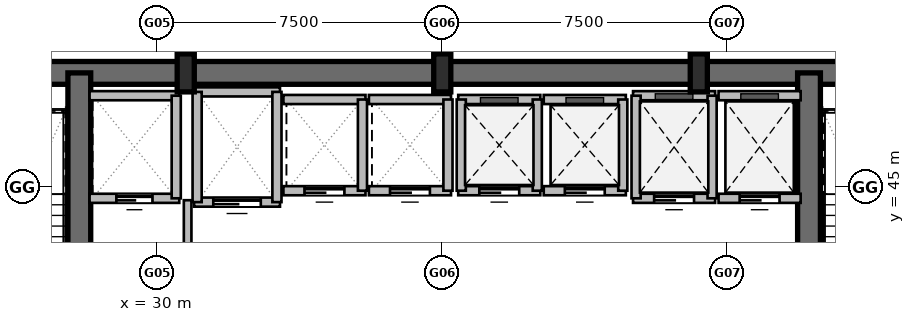
"""IFC4 building model, lengths in metres.
Left out: names, types, materials, properties, quantities, classifications, styles, units other than length and angle.
Written with IfcOpenShell. Run it as: python <this file> out.ifc"""

import sys

from ifc_helpers import new_model, si_unit, direction, frame, frame_2d, origin, origin_2d, place, context, subcontext, project, spatial, rectangle, i_section, extrude, element, fill, save


model = new_model("IFC4")
c1 = context("Model", 3, precision=1e-05, world=origin(), true_north=direction((0.0, 1.0)))
c2 = subcontext(c1, "Body", "Model", "MODEL_VIEW")
j1 = project(units=[si_unit("LENGTHUNIT", "METRE"), si_unit("PLANEANGLEUNIT", "RADIAN")], contexts=[c1])
p1 = place(None, origin())
s1 = spatial("IfcSite", under=j1, at=p1, CompositionType="ELEMENT")
p2 = place(p1, origin())
s2 = spatial("IfcBuilding", under=s1, at=p2, CompositionType="ELEMENT")
p3 = place(p2, origin())
s3 = spatial("IfcBuildingStorey", under=s2, at=p3, CompositionType="ELEMENT", Elevation=0.0)
p4 = place(p3, frame((23.7, 48.0, 0.0), z_axis=(0.0, 0.0, 1.0), x_axis=(1.0, 0.0, 0.0)))
e1 = element("IfcWall", 1, at=p4, inside=s3, PredefinedType="SHEAR", context=c2, shape_type="SweptSolid", body=[
    extrude(rectangle(XDim=27.6, YDim=0.6, at=frame_2d((13.8, 0.0))), origin(), (0.0, 0.0, 1.0), 6.0),
])
for number, where, z_axis, x_axis in (
    (2, (27.95, 38.2, 0.0), (0.0, 0.0, 1.0), (0.0, 1.0, 0.0)),
    (3, (47.15, 38.2, 0.0), (0.0, 0.0, 1.0), (0.0, 1.0, 0.0)),
):
    element("IfcWall", number, at=place(p3, frame(where, z_axis=z_axis, x_axis=x_axis)), inside=s3, PredefinedType="SHEAR", context=c2, shape_type="SweptSolid", body=[
        extrude(rectangle(XDim=9.8, YDim=0.6, at=frame_2d((4.9, 0.0))), origin(), (0.0, 0.0, 1.0), 6.0),
    ])
for number, where, z_axis, x_axis in (
    (4, (30.75, 48.0, 0.0), (0.0, 0.0, 1.0), (1.0, 0.0, 0.0)),
    (5, (37.5, 48.0, 0.0), (0.0, 0.0, 1.0), (1.0, 0.0, 0.0)),
    (6, (44.25, 48.0, 0.0), (0.0, 0.0, 1.0), (1.0, 0.0, 0.0)),
):
    element("IfcColumn", number, at=place(p3, frame(where, z_axis=z_axis, x_axis=x_axis)), inside=s3, PredefinedType="COLUMN", context=c2, shape_type="SweptSolid", body=[
        extrude(i_section(OverallWidth=0.45, OverallDepth=1.0, WebThickness=0.022, FlangeThickness=0.04, at=origin_2d()), origin(), (0.0, 0.0, 1.0), 6.0),
    ])
p5 = place(p3, frame((30.8, 38.2, 0.0), z_axis=(0.0, 0.0, 1.0), x_axis=(0.0, 1.0, 0.0)))
e7 = element("IfcWall", 7, at=p5, inside=s3, PredefinedType="PARTITIONING", context=c2, shape_type="SweptSolid", body=[
    extrude(rectangle(XDim=6.45, YDim=0.2, at=frame_2d((3.225, 0.0))), origin(), (0.0, 0.0, 1.0), 4.88),
])
p6 = place(p5, frame((3.1, 0.0, 0.0)))
e8 = element("IfcOpeningElement", 8, at=p6, cuts=e7, PredefinedType="OPENING", context=c2, shape_type="SweptSolid", body=[
    extrude(rectangle(XDim=1.05, YDim=2.1, at=frame_2d((0.525, 1.05))), frame((0.0, 0.11, 0.0), z_axis=(0.0, -1.0, 0.0), x_axis=(1.0, 0.0, 0.0)), (0.0, 0.0, 1.0), 0.22),
])
p7 = place(p3, frame((28.22, 44.7, 0.0), z_axis=(0.0, 0.0, 1.0), x_axis=(1.0, 0.0, 0.0)))
e9 = element("IfcWall", 9, at=p7, inside=s3, PredefinedType="PARTITIONING", context=c2, shape_type="SweptSolid", body=[
    extrude(rectangle(XDim=2.36, YDim=0.24, at=frame_2d((1.18, 0.0))), origin(), (0.0, 0.0, 1.0), 5.68),
])
p8 = place(p7, frame((0.705, 0.0, 0.0)))
e10 = element("IfcOpeningElement", 10, at=p8, cuts=e9, PredefinedType="OPENING", context=c2, shape_type="SweptSolid", body=[
    extrude(rectangle(XDim=0.95, YDim=2.15, at=frame_2d((0.475, 1.075))), frame((0.0, 0.13, 0.0), z_axis=(0.0, -1.0, 0.0), x_axis=(1.0, 0.0, 0.0)), (0.0, 0.0, 1.0), 0.26),
])
p9 = place(p3, frame((28.22, 47.4, 0.0), z_axis=(0.0, 0.0, 1.0), x_axis=(1.0, 0.0, 0.0)))
e11 = element("IfcWall", 11, at=p9, inside=s3, PredefinedType="PARTITIONING", context=c2, shape_type="SweptSolid", body=[
    extrude(rectangle(XDim=2.36, YDim=0.24, at=frame_2d((1.18, 0.0))), origin(), (0.0, 0.0, 1.0), 5.68),
])
p10 = place(p3, frame((30.5, 44.7, 0.0), z_axis=(0.0, 0.0, 1.0), x_axis=(0.0, 1.0, 0.0)))
e12 = element("IfcWall", 12, at=p10, inside=s3, PredefinedType="PARTITIONING", context=c2, shape_type="SweptSolid", body=[
    extrude(rectangle(XDim=2.7, YDim=0.24, at=frame_2d((1.35, 0.0))), origin(), (0.0, 0.0, 1.0), 4.88),
])
p11 = place(p3, frame((30.97, 44.6, 0.0), z_axis=(0.0, 0.0, 1.0), x_axis=(1.0, 0.0, 0.0)))
e13 = element("IfcWall", 13, at=p11, inside=s3, PredefinedType="PARTITIONING", context=c2, shape_type="SweptSolid", body=[
    extrude(rectangle(XDim=2.26, YDim=0.24, at=frame_2d((1.13, 0.0))), origin(), (0.0, 0.0, 1.0), 5.68),
])
p12 = place(p11, frame((0.505, 0.0, 0.0)))
e14 = element("IfcOpeningElement", 14, at=p12, cuts=e13, PredefinedType="OPENING", context=c2, shape_type="SweptSolid", body=[
    extrude(rectangle(XDim=1.25, YDim=2.2, at=frame_2d((0.625, 1.1))), frame((0.0, 0.13, 0.0), z_axis=(0.0, -1.0, 0.0), x_axis=(1.0, 0.0, 0.0)), (0.0, 0.0, 1.0), 0.26),
])
p13 = place(p3, frame((30.97, 47.5, 0.0), z_axis=(0.0, 0.0, 1.0), x_axis=(1.0, 0.0, 0.0)))
e15 = element("IfcWall", 15, at=p13, inside=s3, PredefinedType="PARTITIONING", context=c2, shape_type="SweptSolid", body=[
    extrude(rectangle(XDim=2.26, YDim=0.24, at=frame_2d((1.13, 0.0))), origin(), (0.0, 0.0, 1.0), 5.68),
])
p14 = place(p3, frame((31.05, 44.6, 0.0), z_axis=(0.0, 0.0, 1.0), x_axis=(0.0, 1.0, 0.0)))
e16 = element("IfcWall", 16, at=p14, inside=s3, PredefinedType="PARTITIONING", context=c2, shape_type="SweptSolid", body=[
    extrude(rectangle(XDim=2.9, YDim=0.24, at=frame_2d((1.45, 0.0))), origin(), (0.0, 0.0, 1.0), 4.88),
])
p15 = place(p3, frame((33.15, 44.6, 0.0), z_axis=(0.0, 0.0, 1.0), x_axis=(0.0, 1.0, 0.0)))
e17 = element("IfcWall", 17, at=p15, inside=s3, PredefinedType="PARTITIONING", context=c2, shape_type="SweptSolid", body=[
    extrude(rectangle(XDim=2.9, YDim=0.24, at=frame_2d((1.45, 0.0))), origin(), (0.0, 0.0, 1.0), 5.68),
])
p16 = place(p3, frame((33.32, 44.9, 0.0), z_axis=(0.0, 0.0, 1.0), x_axis=(1.0, 0.0, 0.0)))
e18 = element("IfcWall", 18, at=p16, inside=s3, PredefinedType="PARTITIONING", context=c2, shape_type="SweptSolid", body=[
    extrude(rectangle(XDim=2.16, YDim=0.24, at=frame_2d((1.08, 0.0))), origin(), (0.0, 0.0, 1.0), 5.68),
])
p17 = place(p16, frame((0.555, 0.0, 0.0)))
e19 = element("IfcOpeningElement", 19, at=p17, cuts=e18, PredefinedType="OPENING", context=c2, shape_type="SweptSolid", body=[
    extrude(rectangle(XDim=1.05, YDim=2.15, at=frame_2d((0.525, 1.075))), frame((0.0, 0.13, 0.0), z_axis=(0.0, -1.0, 0.0), x_axis=(1.0, 0.0, 0.0)), (0.0, 0.0, 1.0), 0.26),
])
p18 = place(p3, frame((33.32, 47.3, 0.0), z_axis=(0.0, 0.0, 1.0), x_axis=(1.0, 0.0, 0.0)))
e20 = element("IfcWall", 20, at=p18, inside=s3, PredefinedType="PARTITIONING", context=c2, shape_type="SweptSolid", body=[
    extrude(rectangle(XDim=2.16, YDim=0.24, at=frame_2d((1.08, 0.0))), origin(), (0.0, 0.0, 1.0), 5.68),
])
p19 = place(p3, frame((35.4, 44.9, 0.0), z_axis=(0.0, 0.0, 1.0), x_axis=(0.0, 1.0, 0.0)))
e21 = element("IfcWall", 21, at=p19, inside=s3, PredefinedType="PARTITIONING", context=c2, shape_type="SweptSolid", body=[
    extrude(rectangle(XDim=2.4, YDim=0.24, at=frame_2d((1.2, 0.0))), origin(), (0.0, 0.0, 1.0), 5.68),
])
p20 = place(p3, frame((35.57, 44.9, 0.0), z_axis=(0.0, 0.0, 1.0), x_axis=(1.0, 0.0, 0.0)))
e22 = element("IfcWall", 22, at=p20, inside=s3, PredefinedType="PARTITIONING", context=c2, shape_type="SweptSolid", body=[
    extrude(rectangle(XDim=2.16, YDim=0.24, at=frame_2d((1.08, 0.0))), origin(), (0.0, 0.0, 1.0), 5.68),
])
p21 = place(p20, frame((0.555, 0.0, 0.0)))
e23 = element("IfcOpeningElement", 23, at=p21, cuts=e22, PredefinedType="OPENING", context=c2, shape_type="SweptSolid", body=[
    extrude(rectangle(XDim=1.05, YDim=2.15, at=frame_2d((0.525, 1.075))), frame((0.0, 0.13, 0.0), z_axis=(0.0, -1.0, 0.0), x_axis=(1.0, 0.0, 0.0)), (0.0, 0.0, 1.0), 0.26),
])
p22 = place(p3, frame((35.57, 47.3, 0.0), z_axis=(0.0, 0.0, 1.0), x_axis=(1.0, 0.0, 0.0)))
e24 = element("IfcWall", 24, at=p22, inside=s3, PredefinedType="PARTITIONING", context=c2, shape_type="SweptSolid", body=[
    extrude(rectangle(XDim=2.16, YDim=0.24, at=frame_2d((1.08, 0.0))), origin(), (0.0, 0.0, 1.0), 5.68),
])
p23 = place(p3, frame((37.65, 44.9, 0.0), z_axis=(0.0, 0.0, 1.0), x_axis=(0.0, 1.0, 0.0)))
e25 = element("IfcWall", 25, at=p23, inside=s3, PredefinedType="PARTITIONING", context=c2, shape_type="SweptSolid", body=[
    extrude(rectangle(XDim=2.4, YDim=0.24, at=frame_2d((1.2, 0.0))), origin(), (0.0, 0.0, 1.0), 5.68),
])
p24 = place(p3, frame((37.92, 44.9, 0.0), z_axis=(0.0, 0.0, 1.0), x_axis=(1.0, 0.0, 0.0)))
e26 = element("IfcWall", 26, at=p24, inside=s3, PredefinedType="PARTITIONING", context=c2, shape_type="SweptSolid", body=[
    extrude(rectangle(XDim=2.16, YDim=0.24, at=frame_2d((1.08, 0.0))), origin(), (0.0, 0.0, 1.0), 5.68),
])
p25 = place(p24, frame((0.555, 0.0, 0.0)))
e27 = element("IfcOpeningElement", 27, at=p25, cuts=e26, PredefinedType="OPENING", context=c2, shape_type="SweptSolid", body=[
    extrude(rectangle(XDim=1.05, YDim=2.15, at=frame_2d((0.525, 1.075))), frame((0.0, 0.13, 0.0), z_axis=(0.0, -1.0, 0.0), x_axis=(1.0, 0.0, 0.0)), (0.0, 0.0, 1.0), 0.26),
])
p26 = place(p3, frame((37.92, 47.3, 0.0), z_axis=(0.0, 0.0, 1.0), x_axis=(1.0, 0.0, 0.0)))
e28 = element("IfcWall", 28, at=p26, inside=s3, PredefinedType="PARTITIONING", context=c2, shape_type="SweptSolid", body=[
    extrude(rectangle(XDim=2.16, YDim=0.24, at=frame_2d((1.08, 0.0))), origin(), (0.0, 0.0, 1.0), 5.68),
])
for number, where, z_axis, x_axis in (
    (29, (38.0, 44.9, 0.0), (0.0, 0.0, 1.0), (0.0, 1.0, 0.0)),
    (30, (40.0, 44.9, 0.0), (0.0, 0.0, 1.0), (0.0, 1.0, 0.0)),
):
    element("IfcWall", number, at=place(p3, frame(where, z_axis=z_axis, x_axis=x_axis)), inside=s3, PredefinedType="PARTITIONING", context=c2, shape_type="SweptSolid", body=[
        extrude(rectangle(XDim=2.4, YDim=0.24, at=frame_2d((1.2, 0.0))), origin(), (0.0, 0.0, 1.0), 5.68),
    ])
p27 = place(p3, frame((40.17, 44.9, 0.0), z_axis=(0.0, 0.0, 1.0), x_axis=(1.0, 0.0, 0.0)))
e31 = element("IfcWall", 31, at=p27, inside=s3, PredefinedType="PARTITIONING", context=c2, shape_type="SweptSolid", body=[
    extrude(rectangle(XDim=2.16, YDim=0.24, at=frame_2d((1.08, 0.0))), origin(), (0.0, 0.0, 1.0), 5.68),
])
p28 = place(p27, frame((0.555, 0.0, 0.0)))
e32 = element("IfcOpeningElement", 32, at=p28, cuts=e31, PredefinedType="OPENING", context=c2, shape_type="SweptSolid", body=[
    extrude(rectangle(XDim=1.05, YDim=2.15, at=frame_2d((0.525, 1.075))), frame((0.0, 0.13, 0.0), z_axis=(0.0, -1.0, 0.0), x_axis=(1.0, 0.0, 0.0)), (0.0, 0.0, 1.0), 0.26),
])
p29 = place(p3, frame((40.17, 47.3, 0.0), z_axis=(0.0, 0.0, 1.0), x_axis=(1.0, 0.0, 0.0)))
e33 = element("IfcWall", 33, at=p29, inside=s3, PredefinedType="PARTITIONING", context=c2, shape_type="SweptSolid", body=[
    extrude(rectangle(XDim=2.16, YDim=0.24, at=frame_2d((1.08, 0.0))), origin(), (0.0, 0.0, 1.0), 5.68),
])
p30 = place(p3, frame((42.25, 44.9, 0.0), z_axis=(0.0, 0.0, 1.0), x_axis=(0.0, 1.0, 0.0)))
e34 = element("IfcWall", 34, at=p30, inside=s3, PredefinedType="PARTITIONING", context=c2, shape_type="SweptSolid", body=[
    extrude(rectangle(XDim=2.4, YDim=0.24, at=frame_2d((1.2, 0.0))), origin(), (0.0, 0.0, 1.0), 5.68),
])
p31 = place(p3, frame((42.52, 44.7, 0.0), z_axis=(0.0, 0.0, 1.0), x_axis=(1.0, 0.0, 0.0)))
e35 = element("IfcWall", 35, at=p31, inside=s3, PredefinedType="PARTITIONING", context=c2, shape_type="SweptSolid", body=[
    extrude(rectangle(XDim=2.16, YDim=0.24, at=frame_2d((1.08, 0.0))), origin(), (0.0, 0.0, 1.0), 5.68),
])
p32 = place(p31, frame((0.555, 0.0, 0.0)))
e36 = element("IfcOpeningElement", 36, at=p32, cuts=e35, PredefinedType="OPENING", context=c2, shape_type="SweptSolid", body=[
    extrude(rectangle(XDim=1.05, YDim=2.15, at=frame_2d((0.525, 1.075))), frame((0.0, 0.13, 0.0), z_axis=(0.0, -1.0, 0.0), x_axis=(1.0, 0.0, 0.0)), (0.0, 0.0, 1.0), 0.26),
])
p33 = place(p3, frame((42.52, 47.4, 0.0), z_axis=(0.0, 0.0, 1.0), x_axis=(1.0, 0.0, 0.0)))
e37 = element("IfcWall", 37, at=p33, inside=s3, PredefinedType="PARTITIONING", context=c2, shape_type="SweptSolid", body=[
    extrude(rectangle(XDim=2.16, YDim=0.24, at=frame_2d((1.08, 0.0))), origin(), (0.0, 0.0, 1.0), 5.68),
])
for number, where, z_axis, x_axis in (
    (38, (42.6, 44.7, 0.0), (0.0, 0.0, 1.0), (0.0, 1.0, 0.0)),
    (39, (44.6, 44.7, 0.0), (0.0, 0.0, 1.0), (0.0, 1.0, 0.0)),
):
    element("IfcWall", number, at=place(p3, frame(where, z_axis=z_axis, x_axis=x_axis)), inside=s3, PredefinedType="PARTITIONING", context=c2, shape_type="SweptSolid", body=[
        extrude(rectangle(XDim=2.7, YDim=0.24, at=frame_2d((1.35, 0.0))), origin(), (0.0, 0.0, 1.0), 5.68),
    ])
p34 = place(p3, frame((44.77, 44.7, 0.0), z_axis=(0.0, 0.0, 1.0), x_axis=(1.0, 0.0, 0.0)))
e40 = element("IfcWall", 40, at=p34, inside=s3, PredefinedType="PARTITIONING", context=c2, shape_type="SweptSolid", body=[
    extrude(rectangle(XDim=2.16, YDim=0.24, at=frame_2d((1.08, 0.0))), origin(), (0.0, 0.0, 1.0), 5.68),
])
p35 = place(p34, frame((0.555, 0.0, 0.0)))
e41 = element("IfcOpeningElement", 41, at=p35, cuts=e40, PredefinedType="OPENING", context=c2, shape_type="SweptSolid", body=[
    extrude(rectangle(XDim=1.05, YDim=2.15, at=frame_2d((0.525, 1.075))), frame((0.0, 0.13, 0.0), z_axis=(0.0, -1.0, 0.0), x_axis=(1.0, 0.0, 0.0)), (0.0, 0.0, 1.0), 0.26),
])
p36 = place(p3, frame((44.77, 47.4, 0.0), z_axis=(0.0, 0.0, 1.0), x_axis=(1.0, 0.0, 0.0)))
e42 = element("IfcWall", 42, at=p36, inside=s3, PredefinedType="PARTITIONING", context=c2, shape_type="SweptSolid", body=[
    extrude(rectangle(XDim=2.16, YDim=0.24, at=frame_2d((1.08, 0.0))), origin(), (0.0, 0.0, 1.0), 5.68),
])
p37 = place(p8, origin())
e43 = element("IfcDoor", 43, at=p37, inside=s3, OperationType="SLIDING_TO_LEFT", PredefinedType="DOOR", context=c2, shape_type="SweptSolid", body=[
    extrude(rectangle(XDim=0.95, YDim=2.15, at=frame_2d((0.475, 1.075))), frame((0.0, 0.025, 0.0), z_axis=(0.0, -1.0, 0.0), x_axis=(1.0, 0.0, 0.0)), (0.0, 0.0, 1.0), 0.05),
])
fill(e10, e43)
p38 = place(p12, origin())
e44 = element("IfcDoor", 44, at=p38, inside=s3, OperationType="SLIDING_TO_LEFT", PredefinedType="DOOR", context=c2, shape_type="SweptSolid", body=[
    extrude(rectangle(XDim=1.25, YDim=2.2, at=frame_2d((0.625, 1.1))), frame((0.0, 0.025, 0.0), z_axis=(0.0, -1.0, 0.0), x_axis=(1.0, 0.0, 0.0)), (0.0, 0.0, 1.0), 0.05),
])
fill(e14, e44)
p39 = place(p17, origin())
e45 = element("IfcDoor", 45, at=p39, inside=s3, OperationType="SLIDING_TO_LEFT", PredefinedType="DOOR", context=c2, shape_type="SweptSolid", body=[
    extrude(rectangle(XDim=1.05, YDim=2.15, at=frame_2d((0.525, 1.075))), frame((0.0, 0.025, 0.0), z_axis=(0.0, -1.0, 0.0), x_axis=(1.0, 0.0, 0.0)), (0.0, 0.0, 1.0), 0.05),
])
fill(e19, e45)
p40 = place(p21, origin())
e46 = element("IfcDoor", 46, at=p40, inside=s3, OperationType="SLIDING_TO_LEFT", PredefinedType="DOOR", context=c2, shape_type="SweptSolid", body=[
    extrude(rectangle(XDim=1.05, YDim=2.15, at=frame_2d((0.525, 1.075))), frame((0.0, 0.025, 0.0), z_axis=(0.0, -1.0, 0.0), x_axis=(1.0, 0.0, 0.0)), (0.0, 0.0, 1.0), 0.05),
])
fill(e23, e46)
p41 = place(p25, origin())
e47 = element("IfcDoor", 47, at=p41, inside=s3, OperationType="SLIDING_TO_LEFT", PredefinedType="DOOR", context=c2, shape_type="SweptSolid", body=[
    extrude(rectangle(XDim=1.05, YDim=2.15, at=frame_2d((0.525, 1.075))), frame((0.0, 0.025, 0.0), z_axis=(0.0, -1.0, 0.0), x_axis=(1.0, 0.0, 0.0)), (0.0, 0.0, 1.0), 0.05),
])
fill(e27, e47)
p42 = place(p28, origin())
e48 = element("IfcDoor", 48, at=p42, inside=s3, OperationType="SLIDING_TO_LEFT", PredefinedType="DOOR", context=c2, shape_type="SweptSolid", body=[
    extrude(rectangle(XDim=1.05, YDim=2.15, at=frame_2d((0.525, 1.075))), frame((0.0, 0.025, 0.0), z_axis=(0.0, -1.0, 0.0), x_axis=(1.0, 0.0, 0.0)), (0.0, 0.0, 1.0), 0.05),
])
fill(e32, e48)
p43 = place(p32, origin())
e49 = element("IfcDoor", 49, at=p43, inside=s3, OperationType="SLIDING_TO_LEFT", PredefinedType="DOOR", context=c2, shape_type="SweptSolid", body=[
    extrude(rectangle(XDim=1.05, YDim=2.15, at=frame_2d((0.525, 1.075))), frame((0.0, 0.025, 0.0), z_axis=(0.0, -1.0, 0.0), x_axis=(1.0, 0.0, 0.0)), (0.0, 0.0, 1.0), 0.05),
])
fill(e36, e49)
p44 = place(p35, origin())
e50 = element("IfcDoor", 50, at=p44, inside=s3, OperationType="SLIDING_TO_LEFT", PredefinedType="DOOR", context=c2, shape_type="SweptSolid", body=[
    extrude(rectangle(XDim=1.05, YDim=2.15, at=frame_2d((0.525, 1.075))), frame((0.0, 0.025, 0.0), z_axis=(0.0, -1.0, 0.0), x_axis=(1.0, 0.0, 0.0)), (0.0, 0.0, 1.0), 0.05),
])
fill(e41, e50)
save(model, sys.argv[1])
